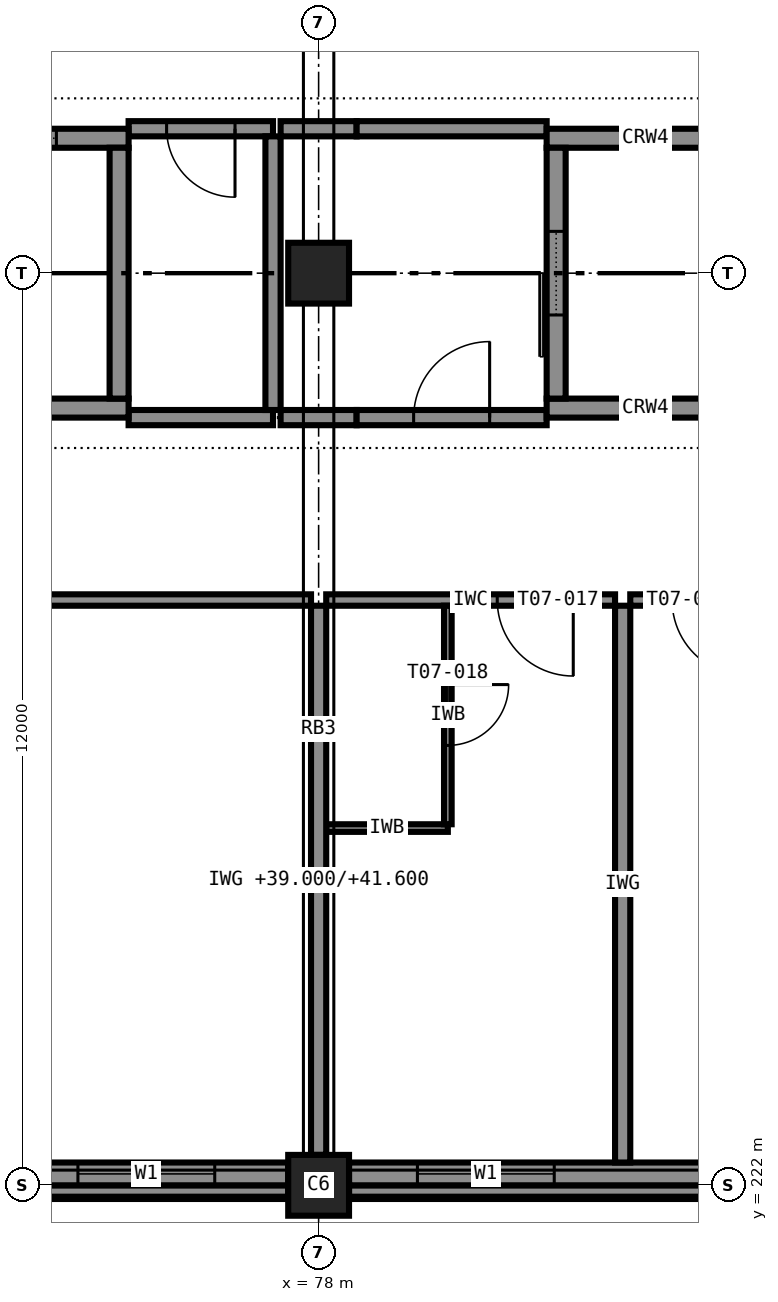
"""IFC4 building model, lengths in metres.
Left out: names, types, materials, properties, quantities, classifications, styles, units other than length and angle.
Written with IfcOpenShell. Run it as: python <this file> out.ifc"""

import sys

from ifc_helpers import new_model, si_unit, direction, frame, frame_2d, origin, origin_2d, place, context, subcontext, project, spatial, rectangle, extrude, element, fill, save


model = new_model("IFC4")
c1 = context("Model", 3, precision=1e-05, world=origin(), true_north=direction((0.0, 1.0)))
c2 = subcontext(c1, "Body", "Model", "MODEL_VIEW")
j1 = project(units=[si_unit("LENGTHUNIT", "METRE"), si_unit("PLANEANGLEUNIT", "RADIAN")], contexts=[c1])
p1 = place(None, origin())
s1 = spatial("IfcSite", under=j1, at=p1, CompositionType="ELEMENT")
p2 = place(p1, origin())
s2 = spatial("IfcBuilding", under=s1, at=p2, CompositionType="ELEMENT")
p3 = place(p2, frame((0.0, 0.0, 39.0)))
s3 = spatial("IfcBuildingStorey", under=s2, at=p3, CompositionType="ELEMENT", Elevation=39.0)
for number, where, z_axis, x_axis in (
    (1, (78.0, 222.0, 0.0), (0.0, 0.0, 1.0), (1.0, 0.0, 0.0)),
    (2, (78.0, 234.0, 0.0), (0.0, 0.0, 1.0), (1.0, 0.0, 0.0)),
):
    element("IfcColumn", number, at=place(p3, frame(where, z_axis=z_axis, x_axis=x_axis)), inside=s3, PredefinedType="COLUMN", context=c2, shape_type="SweptSolid", body=[
        extrude(rectangle(XDim=0.8, YDim=0.8, at=origin_2d()), origin(), (0.0, 0.0, 1.0), 3.6),
    ])
p4 = place(p3, frame((72.5, 232.225, 0.0), z_axis=(0.0, 0.0, 1.0), x_axis=(1.0, 0.0, 0.0)))
e3 = element("IfcWall", 3, at=p4, inside=s3, PredefinedType="SHEAR", context=c2, shape_type="SweptSolid", body=[
    extrude(rectangle(XDim=3.0, YDim=0.25, at=frame_2d((1.5, 0.0))), origin(), (0.0, 0.0, 1.0), 3.6),
])
p5 = place(p3, frame((72.5, 235.775, 0.0), z_axis=(0.0, 0.0, 1.0), x_axis=(1.0, 0.0, 0.0)))
e4 = element("IfcWall", 4, at=p5, inside=s3, PredefinedType="SHEAR", context=c2, shape_type="SweptSolid", body=[
    extrude(rectangle(XDim=3.0, YDim=0.25, at=frame_2d((1.5, 0.0))), origin(), (0.0, 0.0, 1.0), 3.6),
])
p6 = place(p5, frame((0.95, 0.0, 0.0)))
e5 = element("IfcOpeningElement", 5, at=p6, cuts=e4, PredefinedType="OPENING", context=c2, shape_type="SweptSolid", body=[
    extrude(rectangle(XDim=1.1, YDim=2.1, at=frame_2d((0.55, 1.05))), frame((0.0, 0.135, 0.0), z_axis=(0.0, -1.0, 0.0), x_axis=(1.0, 0.0, 0.0)), (0.0, 0.0, 1.0), 0.27),
])
p7 = place(p3, frame((75.375, 232.35, 0.0), z_axis=(0.0, 0.0, 1.0), x_axis=(0.0, 1.0, 0.0)))
e6 = element("IfcWall", 6, at=p7, inside=s3, PredefinedType="SHEAR", context=c2, shape_type="SweptSolid", body=[
    extrude(rectangle(XDim=3.3, YDim=0.25, at=frame_2d((1.65, 0.0))), origin(), (0.0, 0.0, 1.0), 3.6),
])
for number, where, z_axis, x_axis in (
    (7, (81.0, 232.225, 0.0), (0.0, 0.0, 1.0), (1.0, 0.0, 0.0)),
    (8, (81.0, 235.775, 0.0), (0.0, 0.0, 1.0), (1.0, 0.0, 0.0)),
):
    element("IfcWall", number, at=place(p3, frame(where, z_axis=z_axis, x_axis=x_axis)), inside=s3, PredefinedType="SHEAR", context=c2, shape_type="SweptSolid", body=[
        extrude(rectangle(XDim=2.6, YDim=0.25, at=frame_2d((1.3, 0.0))), origin(), (0.0, 0.0, 1.0), 3.6),
    ])
p8 = place(p3, frame((81.125, 232.35, 0.0), z_axis=(0.0, 0.0, 1.0), x_axis=(0.0, 1.0, 0.0)))
e9 = element("IfcWall", 9, at=p8, inside=s3, PredefinedType="SHEAR", context=c2, shape_type="SweptSolid", body=[
    extrude(rectangle(XDim=3.3, YDim=0.25, at=frame_2d((1.65, 0.0))), origin(), (0.0, 0.0, 1.0), 3.6),
])
p9 = place(p8, frame((1.1, 0.0, 0.0)))
e10 = element("IfcOpeningElement", 10, at=p9, cuts=e9, PredefinedType="OPENING", context=c2, shape_type="SweptSolid", body=[
    extrude(rectangle(XDim=1.1, YDim=2.1, at=frame_2d((0.55, 1.05))), frame((0.0, 0.135, 0.0), z_axis=(0.0, -1.0, 0.0), x_axis=(1.0, 0.0, 0.0)), (0.0, 0.0, 1.0), 0.27),
])
p10 = place(p3, frame((66.4, 222.15, 0.0), z_axis=(0.0, 0.0, 1.0), x_axis=(1.0, 0.0, 0.0)))
e11 = element("IfcWall", 11, at=p10, inside=s3, PredefinedType="STANDARD", context=c2, shape_type="SweptSolid", body=[
    extrude(rectangle(XDim=11.2, YDim=0.3, at=frame_2d((5.6, 0.0))), origin(), (0.0, 0.0, 1.0), 2.6),
])
p11 = place(p10, frame((0.967, 0.0, 0.85)))
e12 = element("IfcOpeningElement", 12, at=p11, cuts=e11, PredefinedType="OPENING", context=c2, shape_type="SweptSolid", body=[
    extrude(rectangle(XDim=1.8, YDim=1.75, at=frame_2d((0.9, 0.875))), frame((0.0, 0.16, 0.0), z_axis=(0.0, -1.0, 0.0), x_axis=(1.0, 0.0, 0.0)), (0.0, 0.0, 1.0), 0.32),
])
p12 = place(p10, frame((4.7, 0.0, 0.85)))
e13 = element("IfcOpeningElement", 13, at=p12, cuts=e11, PredefinedType="OPENING", context=c2, shape_type="SweptSolid", body=[
    extrude(rectangle(XDim=1.8, YDim=1.75, at=frame_2d((0.9, 0.875))), frame((0.0, 0.16, 0.0), z_axis=(0.0, -1.0, 0.0), x_axis=(1.0, 0.0, 0.0)), (0.0, 0.0, 1.0), 0.32),
])
p13 = place(p10, frame((8.433, 0.0, 0.85)))
e14 = element("IfcOpeningElement", 14, at=p13, cuts=e11, PredefinedType="OPENING", context=c2, shape_type="SweptSolid", body=[
    extrude(rectangle(XDim=1.8, YDim=1.75, at=frame_2d((0.9, 0.875))), frame((0.0, 0.16, 0.0), z_axis=(0.0, -1.0, 0.0), x_axis=(1.0, 0.0, 0.0)), (0.0, 0.0, 1.0), 0.32),
])
p14 = place(p3, frame((78.4, 222.15, 0.0), z_axis=(0.0, 0.0, 1.0), x_axis=(1.0, 0.0, 0.0)))
e15 = element("IfcWall", 15, at=p14, inside=s3, PredefinedType="STANDARD", context=c2, shape_type="SweptSolid", body=[
    extrude(rectangle(XDim=11.2, YDim=0.3, at=frame_2d((5.6, 0.0))), origin(), (0.0, 0.0, 1.0), 2.6),
])
p15 = place(p14, frame((0.9, 0.0, 0.85)))
e16 = element("IfcOpeningElement", 16, at=p15, cuts=e15, PredefinedType="OPENING", context=c2, shape_type="SweptSolid", body=[
    extrude(rectangle(XDim=1.8, YDim=1.75, at=frame_2d((0.9, 0.875))), frame((0.0, 0.16, 0.0), z_axis=(0.0, -1.0, 0.0), x_axis=(1.0, 0.0, 0.0)), (0.0, 0.0, 1.0), 0.32),
])
p16 = place(p14, frame((4.7, 0.0, 0.85)))
e17 = element("IfcOpeningElement", 17, at=p16, cuts=e15, PredefinedType="OPENING", context=c2, shape_type="SweptSolid", body=[
    extrude(rectangle(XDim=1.8, YDim=1.75, at=frame_2d((0.9, 0.875))), frame((0.0, 0.16, 0.0), z_axis=(0.0, -1.0, 0.0), x_axis=(1.0, 0.0, 0.0)), (0.0, 0.0, 1.0), 0.32),
])
for number, where, z_axis, x_axis in (
    (18, (66.4, 221.925, 3.4), (0.0, 0.0, 1.0), (1.0, 0.0, 0.0)),
    (19, (78.4, 221.925, 3.4), (0.0, 0.0, 1.0), (1.0, 0.0, 0.0)),
):
    element("IfcWall", number, at=place(p3, frame(where, z_axis=z_axis, x_axis=x_axis)), inside=s3, PredefinedType="STANDARD", context=c2, shape_type="SweptSolid", body=[
        extrude(rectangle(XDim=11.2, YDim=0.15, at=frame_2d((5.6, 0.0))), origin(), (0.0, 0.0, 1.0), 0.2),
    ])
p17 = place(p3, frame((75.5, 232.1, 0.0), z_axis=(0.0, 0.0, 1.0), x_axis=(1.0, 0.0, 0.0)))
e20 = element("IfcWall", 20, at=p17, inside=s3, PredefinedType="PARTITIONING", context=c2, shape_type="SweptSolid", body=[
    extrude(rectangle(XDim=1.9, YDim=0.2, at=frame_2d((0.95, 0.0))), origin(), (0.0, 0.0, 1.0), 3.4),
])
p18 = place(p3, frame((77.5, 232.1, 0.0), z_axis=(0.0, 0.0, 1.0), x_axis=(1.0, 0.0, 0.0)))
e21 = element("IfcWall", 21, at=p18, inside=s3, PredefinedType="PARTITIONING", context=c2, shape_type="SweptSolid", body=[
    extrude(rectangle(XDim=1.0, YDim=0.2, at=frame_2d((0.5, 0.0))), origin(), (0.0, 0.0, 1.0), 3.4),
])
p19 = place(p3, frame((78.5, 232.1, 0.0), z_axis=(0.0, 0.0, 1.0), x_axis=(1.0, 0.0, 0.0)))
e22 = element("IfcWall", 22, at=p19, inside=s3, PredefinedType="PARTITIONING", context=c2, shape_type="SweptSolid", body=[
    extrude(rectangle(XDim=2.5, YDim=0.2, at=frame_2d((1.25, 0.0))), origin(), (0.0, 0.0, 1.0), 3.4),
])
p20 = place(p19, frame((0.75, 0.0, 0.0)))
e23 = element("IfcOpeningElement", 23, at=p20, cuts=e22, PredefinedType="OPENING", context=c2, shape_type="SweptSolid", body=[
    extrude(rectangle(XDim=1.0, YDim=2.1, at=frame_2d((0.5, 1.05))), frame((0.0, 0.11, 0.0), z_axis=(0.0, -1.0, 0.0), x_axis=(1.0, 0.0, 0.0)), (0.0, 0.0, 1.0), 0.22),
])
p21 = place(p3, frame((77.4, 235.9, 0.0), z_axis=(0.0, 0.0, 1.0), x_axis=(-1.0, 0.0, 0.0)))
e24 = element("IfcWall", 24, at=p21, inside=s3, PredefinedType="PARTITIONING", context=c2, shape_type="SweptSolid", body=[
    extrude(rectangle(XDim=1.9, YDim=0.2, at=frame_2d((0.95, 0.0))), origin(), (0.0, 0.0, 1.0), 3.4),
])
p22 = place(p21, frame((0.5, 0.0, 0.0)))
e25 = element("IfcOpeningElement", 25, at=p22, cuts=e24, PredefinedType="OPENING", context=c2, shape_type="SweptSolid", body=[
    extrude(rectangle(XDim=0.9, YDim=2.1, at=frame_2d((0.45, 1.05))), frame((0.0, 0.11, 0.0), z_axis=(0.0, -1.0, 0.0), x_axis=(1.0, 0.0, 0.0)), (0.0, 0.0, 1.0), 0.22),
])
p23 = place(p3, frame((77.5, 235.9, 0.0), z_axis=(0.0, 0.0, 1.0), x_axis=(1.0, 0.0, 0.0)))
e26 = element("IfcWall", 26, at=p23, inside=s3, PredefinedType="PARTITIONING", context=c2, shape_type="SweptSolid", body=[
    extrude(rectangle(XDim=1.0, YDim=0.2, at=frame_2d((0.5, 0.0))), origin(), (0.0, 0.0, 1.0), 3.4),
])
p24 = place(p3, frame((78.5, 235.9, 0.0), z_axis=(0.0, 0.0, 1.0), x_axis=(1.0, 0.0, 0.0)))
e27 = element("IfcWall", 27, at=p24, inside=s3, PredefinedType="PARTITIONING", context=c2, shape_type="SweptSolid", body=[
    extrude(rectangle(XDim=2.5, YDim=0.2, at=frame_2d((1.25, 0.0))), origin(), (0.0, 0.0, 1.0), 3.4),
])
p25 = place(p3, frame((77.4, 232.2, 0.0), z_axis=(0.0, 0.0, 1.0), x_axis=(0.0, 1.0, 0.0)))
e28 = element("IfcWall", 28, at=p25, inside=s3, PredefinedType="PARTITIONING", context=c2, shape_type="SweptSolid", body=[
    extrude(rectangle(XDim=3.6, YDim=0.2, at=frame_2d((1.8, 0.0))), origin(), (0.0, 0.0, 1.0), 3.4),
])
p26 = place(p3, frame((77.9, 229.7, 0.0), z_axis=(0.0, 0.0, 1.0), x_axis=(-1.0, 0.0, 0.0)))
e29 = element("IfcWall", 29, at=p26, inside=s3, PredefinedType="PARTITIONING", context=c2, shape_type="SweptSolid", body=[
    extrude(rectangle(XDim=11.8, YDim=0.15, at=frame_2d((5.9, 0.0))), origin(), (0.0, 0.0, 1.0), 3.4),
])
p27 = place(p26, frame((5.0, 0.0, 0.0)))
e30 = element("IfcOpeningElement", 30, at=p27, cuts=e29, PredefinedType="OPENING", context=c2, shape_type="SweptSolid", body=[
    extrude(rectangle(XDim=1.8, YDim=2.1, at=frame_2d((0.9, 1.05))), frame((0.0, 0.085, 0.0), z_axis=(0.0, -1.0, 0.0), x_axis=(1.0, 0.0, 0.0)), (0.0, 0.0, 1.0), 0.17),
])
p28 = place(p3, frame((81.9, 229.7, 0.0), z_axis=(0.0, 0.0, 1.0), x_axis=(-1.0, 0.0, 0.0)))
e31 = element("IfcWall", 31, at=p28, inside=s3, PredefinedType="PARTITIONING", context=c2, shape_type="SweptSolid", body=[
    extrude(rectangle(XDim=3.8, YDim=0.15, at=frame_2d((1.9, 0.0))), origin(), (0.0, 0.0, 1.0), 3.4),
])
p29 = place(p28, frame((0.55, 0.0, 0.0)))
e32 = element("IfcOpeningElement", 32, at=p29, cuts=e31, PredefinedType="OPENING", context=c2, shape_type="SweptSolid", body=[
    extrude(rectangle(XDim=1.0, YDim=2.1, at=frame_2d((0.5, 1.05))), frame((0.0, 0.085, 0.0), z_axis=(0.0, -1.0, 0.0), x_axis=(1.0, 0.0, 0.0)), (0.0, 0.0, 1.0), 0.17),
])
p30 = place(p3, frame((78.1, 226.7, 0.0), z_axis=(0.0, 0.0, 1.0), x_axis=(1.0, 0.0, 0.0)))
e33 = element("IfcWall", 33, at=p30, inside=s3, PredefinedType="PARTITIONING", context=c2, shape_type="SweptSolid", body=[
    extrude(rectangle(XDim=1.6, YDim=0.1, at=frame_2d((0.8, 0.0))), origin(), (0.0, 0.0, 1.0), 3.4),
])
p31 = place(p3, frame((79.7, 229.625, 0.0), z_axis=(0.0, 0.0, 1.0), x_axis=(0.0, -1.0, 0.0)))
e34 = element("IfcWall", 34, at=p31, inside=s3, PredefinedType="PARTITIONING", context=c2, shape_type="SweptSolid", body=[
    extrude(rectangle(XDim=2.875, YDim=0.1, at=frame_2d((1.438, 0.0))), origin(), (0.0, 0.0, 1.0), 3.4),
])
p32 = place(p31, frame((1.038, 0.0, 0.0)))
e35 = element("IfcOpeningElement", 35, at=p32, cuts=e34, PredefinedType="OPENING", context=c2, shape_type="SweptSolid", body=[
    extrude(rectangle(XDim=0.8, YDim=2.1, at=frame_2d((0.4, 1.05))), frame((0.0, 0.06, 0.0), z_axis=(0.0, -1.0, 0.0), x_axis=(1.0, 0.0, 0.0)), (0.0, 0.0, 1.0), 0.12),
])
p33 = place(p3, frame((86.0, 229.7, 0.0), z_axis=(0.0, 0.0, 1.0), x_axis=(-1.0, 0.0, 0.0)))
e36 = element("IfcWall", 36, at=p33, inside=s3, PredefinedType="PARTITIONING", context=c2, shape_type="SweptSolid", body=[
    extrude(rectangle(XDim=3.9, YDim=0.15, at=frame_2d((1.95, 0.0))), origin(), (0.0, 0.0, 1.0), 3.4),
])
p34 = place(p33, frame((2.35, 0.0, 0.0)))
e37 = element("IfcOpeningElement", 37, at=p34, cuts=e36, PredefinedType="OPENING", context=c2, shape_type="SweptSolid", body=[
    extrude(rectangle(XDim=1.0, YDim=2.1, at=frame_2d((0.5, 1.05))), frame((0.0, 0.085, 0.0), z_axis=(0.0, -1.0, 0.0), x_axis=(1.0, 0.0, 0.0)), (0.0, 0.0, 1.0), 0.17),
])
p35 = place(p3, frame((78.0, 222.4, 0.0), z_axis=(0.0, 0.0, 1.0), x_axis=(0.0, 1.0, 0.0)))
e38 = element("IfcWall", 38, at=p35, inside=s3, PredefinedType="PARTITIONING", context=c2, shape_type="SweptSolid", body=[
    extrude(rectangle(XDim=7.225, YDim=0.2, at=frame_2d((3.613, 0.0))), origin(), (0.0, 0.0, 1.0), 2.6),
])
p36 = place(p3, frame((82.0, 222.3, 0.0), z_axis=(0.0, 0.0, 1.0), x_axis=(0.0, 1.0, 0.0)))
e39 = element("IfcWall", 39, at=p36, inside=s3, PredefinedType="PARTITIONING", context=c2, shape_type="SweptSolid", body=[
    extrude(rectangle(XDim=7.325, YDim=0.2, at=frame_2d((3.663, 0.0))), origin(), (0.0, 0.0, 1.0), 3.4),
])
p37 = place(p13, origin())
e40 = element("IfcWindow", 40, at=p37, inside=s3, PartitioningType="SINGLE_PANEL", PredefinedType="WINDOW", context=c2, shape_type="SweptSolid", body=[
    extrude(rectangle(XDim=1.8, YDim=1.75, at=frame_2d((0.9, 0.875))), frame((0.0, 0.03, 0.0), z_axis=(0.0, -1.0, 0.0), x_axis=(1.0, 0.0, 0.0)), (0.0, 0.0, 1.0), 0.06),
])
fill(e14, e40)
p38 = place(p15, origin())
e41 = element("IfcWindow", 41, at=p38, inside=s3, PartitioningType="SINGLE_PANEL", PredefinedType="WINDOW", context=c2, shape_type="SweptSolid", body=[
    extrude(rectangle(XDim=1.8, YDim=1.75, at=frame_2d((0.9, 0.875))), frame((0.0, 0.03, 0.0), z_axis=(0.0, -1.0, 0.0), x_axis=(1.0, 0.0, 0.0)), (0.0, 0.0, 1.0), 0.06),
])
fill(e16, e41)
p39 = place(p22, origin())
e42 = element("IfcDoor", 42, at=p39, inside=s3, OperationType="SINGLE_SWING_LEFT", PredefinedType="DOOR", context=c2, shape_type="SweptSolid", body=[
    extrude(rectangle(XDim=0.9, YDim=2.1, at=frame_2d((0.45, 1.05))), frame((0.0, 0.025, 0.0), z_axis=(0.0, -1.0, 0.0), x_axis=(1.0, 0.0, 0.0)), (0.0, 0.0, 1.0), 0.05),
])
fill(e25, e42)
p40 = place(p20, origin())
e43 = element("IfcDoor", 43, at=p40, inside=s3, OperationType="SINGLE_SWING_RIGHT", PredefinedType="DOOR", context=c2, shape_type="SweptSolid", body=[
    extrude(rectangle(XDim=1.0, YDim=2.1, at=frame_2d((0.5, 1.05))), frame((0.0, 0.025, 0.0), z_axis=(0.0, -1.0, 0.0), x_axis=(1.0, 0.0, 0.0)), (0.0, 0.0, 1.0), 0.05),
])
fill(e23, e43)
p41 = place(p29, origin())
e44 = element("IfcDoor", 44, at=p41, inside=s3, OperationType="SINGLE_SWING_LEFT", PredefinedType="DOOR", context=c2, shape_type="SweptSolid", body=[
    extrude(rectangle(XDim=1.0, YDim=2.1, at=frame_2d((0.5, 1.05))), frame((0.0, 0.025, 0.0), z_axis=(0.0, -1.0, 0.0), x_axis=(1.0, 0.0, 0.0)), (0.0, 0.0, 1.0), 0.05),
])
fill(e32, e44)
p42 = place(p32, origin())
e45 = element("IfcDoor", 45, at=p42, inside=s3, OperationType="SINGLE_SWING_LEFT", PredefinedType="DOOR", context=c2, shape_type="SweptSolid", body=[
    extrude(rectangle(XDim=0.8, YDim=2.1, at=frame_2d((0.4, 1.05))), frame((0.0, 0.025, 0.0), z_axis=(0.0, -1.0, 0.0), x_axis=(1.0, 0.0, 0.0)), (0.0, 0.0, 1.0), 0.05),
])
fill(e35, e45)
p43 = place(p34, origin())
e46 = element("IfcDoor", 46, at=p43, inside=s3, OperationType="SINGLE_SWING_LEFT", PredefinedType="DOOR", context=c2, shape_type="SweptSolid", body=[
    extrude(rectangle(XDim=1.0, YDim=2.1, at=frame_2d((0.5, 1.05))), frame((0.0, 0.025, 0.0), z_axis=(0.0, -1.0, 0.0), x_axis=(1.0, 0.0, 0.0)), (0.0, 0.0, 1.0), 0.05),
])
fill(e37, e46)
p44 = place(p6, origin())
e47 = element("IfcDoor", 47, at=p44, inside=s3, OperationType="SLIDING_TO_LEFT", PredefinedType="DOOR", context=c2, shape_type="SweptSolid", body=[
    extrude(rectangle(XDim=1.1, YDim=2.1, at=frame_2d((0.55, 1.05))), frame((0.0, 0.025, 0.0), z_axis=(0.0, -1.0, 0.0), x_axis=(1.0, 0.0, 0.0)), (0.0, 0.0, 1.0), 0.05),
])
fill(e5, e47)
p45 = place(p9, origin())
e48 = element("IfcDoor", 48, at=p45, inside=s3, OperationType="SLIDING_TO_LEFT", PredefinedType="DOOR", context=c2, shape_type="SweptSolid", body=[
    extrude(rectangle(XDim=1.1, YDim=2.1, at=frame_2d((0.55, 1.05))), frame((0.0, 0.025, 0.0), z_axis=(0.0, -1.0, 0.0), x_axis=(1.0, 0.0, 0.0)), (0.0, 0.0, 1.0), 0.05),
])
fill(e10, e48)
save(model, sys.argv[1])
